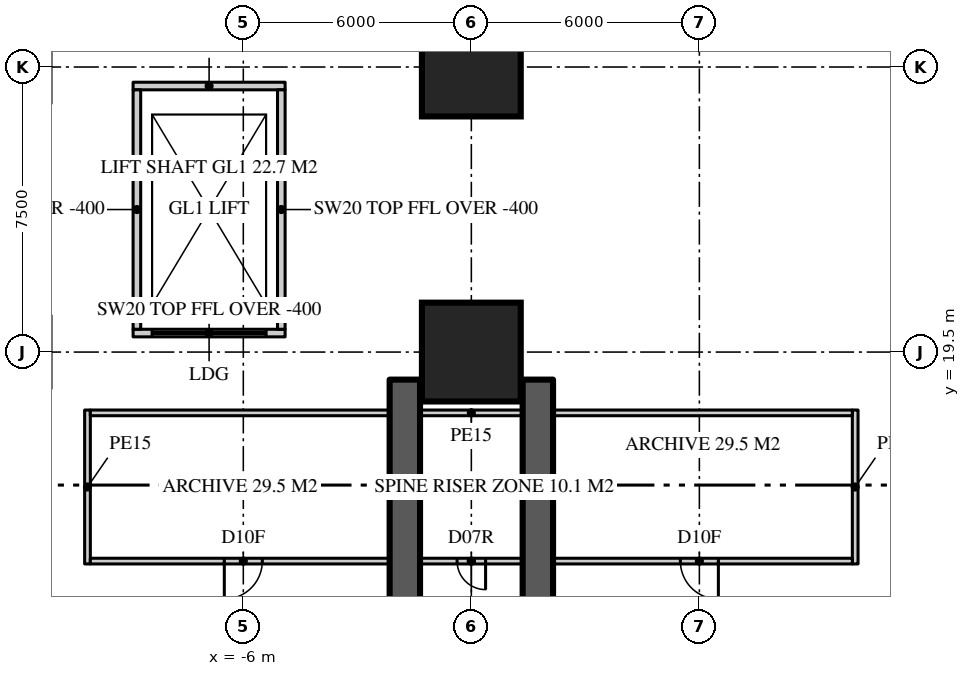
"""IFC4 building model, lengths in metres.
Left out: names, types, materials, properties, quantities, classifications, styles, units other than length and angle.
Written with IfcOpenShell. Run it as: python <this file> out.ifc"""

import sys

from ifc_helpers import new_model, si_unit, direction, frame, frame_2d, origin, origin_2d, place, context, subcontext, project, spatial, rectangle, extrude, element, fill, save


model = new_model("IFC4")
c1 = context("Model", 3, precision=1e-05, world=origin(), true_north=direction((0.0, 1.0)))
c2 = subcontext(c1, "Body", "Model", "MODEL_VIEW")
j1 = project(units=[si_unit("LENGTHUNIT", "METRE"), si_unit("PLANEANGLEUNIT", "RADIAN")], contexts=[c1])
p1 = place(None, origin())
s1 = spatial("IfcSite", under=j1, at=p1, CompositionType="ELEMENT")
p2 = place(p1, origin())
s2 = spatial("IfcBuilding", under=s1, at=p2, CompositionType="ELEMENT")
p3 = place(p2, frame((0.0, 0.0, -5.0)))
s3 = spatial("IfcBuildingStorey", under=s2, at=p3, CompositionType="ELEMENT", Elevation=-5.0)
for number, where, z_axis, x_axis in (
    (1, (1.75, 11.15, 0.0), (0.0, 0.0, 1.0), (0.0, 1.0, 0.0)),
    (2, (-1.75, 11.15, 0.0), (0.0, 0.0, 1.0), (0.0, 1.0, 0.0)),
):
    element("IfcWall", number, at=place(p3, frame(where, z_axis=z_axis, x_axis=x_axis)), inside=s3, PredefinedType="SHEAR", context=c2, shape_type="SweptSolid", body=[
        extrude(rectangle(XDim=7.625, YDim=0.8, at=frame_2d((3.812, 0.0))), origin(), (0.0, 0.0, 1.0), 5.0),
    ])
for number, where, z_axis, x_axis in (
    (3, (0.0, 19.5, 0.0), (0.0, 0.0, 1.0), (1.0, 0.0, 0.0)),
    (4, (0.0, 27.0, 0.0), (0.0, 0.0, 1.0), (1.0, 0.0, 0.0)),
):
    element("IfcColumn", number, at=place(p3, frame(where, z_axis=z_axis, x_axis=x_axis)), inside=s3, PredefinedType="COLUMN", context=c2, shape_type="SweptSolid", body=[
        extrude(rectangle(XDim=2.6, YDim=2.6, at=origin_2d()), origin(), (0.0, 0.0, 1.0), 5.0),
    ])
for number, where, z_axis, x_axis in (
    (5, (10.1, 13.925, 0.0), (0.0, 0.0, 1.0), (0.0, 1.0, 0.0)),
    (6, (-10.1, 13.925, 0.0), (0.0, 0.0, 1.0), (0.0, 1.0, 0.0)),
):
    element("IfcWall", number, at=place(p3, frame(where, z_axis=z_axis, x_axis=x_axis)), inside=s3, PredefinedType="SOLIDWALL", context=c2, shape_type="SweptSolid", body=[
        extrude(rectangle(XDim=4.05, YDim=0.15, at=frame_2d((2.025, 0.0))), origin(), (0.0, 0.0, 1.0), 4.6),
    ])
p4 = place(p3, frame((10.025, 17.9, 0.0), z_axis=(0.0, 0.0, 1.0), x_axis=(-1.0, 0.0, 0.0)))
e7 = element("IfcWall", 7, at=p4, inside=s3, PredefinedType="SOLIDWALL", context=c2, shape_type="SweptSolid", body=[
    extrude(rectangle(XDim=20.05, YDim=0.15, at=frame_2d((10.025, 0.0))), origin(), (0.0, 0.0, 1.0), 4.6),
])
p5 = place(p3, frame((10.025, 14.0, 0.0), z_axis=(0.0, 0.0, 1.0), x_axis=(-1.0, 0.0, 0.0)))
e8 = element("IfcWall", 8, at=p5, inside=s3, PredefinedType="SOLIDWALL", context=c2, shape_type="SweptSolid", body=[
    extrude(rectangle(XDim=20.05, YDim=0.15, at=frame_2d((10.025, 0.0))), origin(), (0.0, 0.0, 1.0), 4.6),
])
p6 = place(p5, frame((9.65, 0.0, 0.0)))
e9 = element("IfcOpeningElement", 9, at=p6, cuts=e8, PredefinedType="OPENING", context=c2, shape_type="SweptSolid", body=[
    extrude(rectangle(XDim=0.75, YDim=2.1, at=frame_2d((0.375, 1.05))), frame((0.0, 0.085, 0.0), z_axis=(0.0, -1.0, 0.0), x_axis=(1.0, 0.0, 0.0)), (0.0, 0.0, 1.0), 0.17),
])
p7 = place(p5, frame((3.525, 0.0, 0.0)))
e10 = element("IfcOpeningElement", 10, at=p7, cuts=e8, PredefinedType="OPENING", context=c2, shape_type="SweptSolid", body=[
    extrude(rectangle(XDim=1.0, YDim=2.2, at=frame_2d((0.5, 1.1))), frame((0.0, 0.085, 0.0), z_axis=(0.0, -1.0, 0.0), x_axis=(1.0, 0.0, 0.0)), (0.0, 0.0, 1.0), 0.17),
])
p8 = place(p5, frame((15.525, 0.0, 0.0)))
e11 = element("IfcOpeningElement", 11, at=p8, cuts=e8, PredefinedType="OPENING", context=c2, shape_type="SweptSolid", body=[
    extrude(rectangle(XDim=1.0, YDim=2.2, at=frame_2d((0.5, 1.1))), frame((0.0, 0.085, 0.0), z_axis=(0.0, -1.0, 0.0), x_axis=(1.0, 0.0, 0.0)), (0.0, 0.0, 1.0), 0.17),
])
p9 = place(p3, frame((-4.9, 20.0, 0.0), z_axis=(0.0, 0.0, 1.0), x_axis=(-1.0, 0.0, 0.0)))
e12 = element("IfcWall", 12, at=p9, inside=s3, PredefinedType="SOLIDWALL", context=c2, shape_type="SweptSolid", body=[
    extrude(rectangle(XDim=4.0, YDim=0.2, at=frame_2d((2.0, 0.0))), origin(), (0.0, 0.0, 1.0), 4.6),
])
p10 = place(p9, frame((0.5, 0.0, 0.0)))
e13 = element("IfcOpeningElement", 13, at=p10, cuts=e12, PredefinedType="OPENING", context=c2, shape_type="SweptSolid", body=[
    extrude(rectangle(XDim=3.0, YDim=3.0, at=frame_2d((1.5, 1.5))), frame((0.0, 0.11, 0.0), z_axis=(0.0, -1.0, 0.0), x_axis=(1.0, 0.0, 0.0)), (0.0, 0.0, 1.0), 0.22),
])
p11 = place(p3, frame((-8.9, 26.5, 0.0), z_axis=(0.0, 0.0, 1.0), x_axis=(1.0, 0.0, 0.0)))
e14 = element("IfcWall", 14, at=p11, inside=s3, PredefinedType="SOLIDWALL", context=c2, shape_type="SweptSolid", body=[
    extrude(rectangle(XDim=4.0, YDim=0.2, at=frame_2d((2.0, 0.0))), origin(), (0.0, 0.0, 1.0), 4.6),
])
for number, where, z_axis, x_axis in (
    (15, (-5.0, 20.1, 0.0), (0.0, 0.0, 1.0), (0.0, 1.0, 0.0)),
    (16, (-8.8, 26.4, 0.0), (0.0, 0.0, 1.0), (0.0, -1.0, 0.0)),
):
    element("IfcWall", number, at=place(p3, frame(where, z_axis=z_axis, x_axis=x_axis)), inside=s3, PredefinedType="SOLIDWALL", context=c2, shape_type="SweptSolid", body=[
        extrude(rectangle(XDim=6.3, YDim=0.2, at=frame_2d((3.15, 0.0))), origin(), (0.0, 0.0, 1.0), 4.6),
    ])
p12 = place(p10, origin())
e17 = element("IfcDoor", 17, at=p12, inside=s3, OperationType="SLIDING_TO_LEFT", PredefinedType="DOOR", context=c2, shape_type="SweptSolid", body=[
    extrude(rectangle(XDim=3.0, YDim=3.0, at=frame_2d((1.5, 1.5))), frame((0.0, 0.025, 0.0), z_axis=(0.0, -1.0, 0.0), x_axis=(1.0, 0.0, 0.0)), (0.0, 0.0, 1.0), 0.05),
])
fill(e13, e17)
p13 = place(p6, origin())
e18 = element("IfcDoor", 18, at=p13, inside=s3, OperationType="SINGLE_SWING_LEFT", PredefinedType="DOOR", context=c2, shape_type="SweptSolid", body=[
    extrude(rectangle(XDim=0.75, YDim=2.1, at=frame_2d((0.375, 1.05))), frame((0.0, 0.025, 0.0), z_axis=(0.0, -1.0, 0.0), x_axis=(1.0, 0.0, 0.0)), (0.0, 0.0, 1.0), 0.05),
])
fill(e9, e18)
p14 = place(p7, origin())
e19 = element("IfcDoor", 19, at=p14, inside=s3, OperationType="SINGLE_SWING_LEFT", PredefinedType="DOOR", context=c2, shape_type="SweptSolid", body=[
    extrude(rectangle(XDim=1.0, YDim=2.2, at=frame_2d((0.5, 1.1))), frame((0.0, 0.025, 0.0), z_axis=(0.0, -1.0, 0.0), x_axis=(1.0, 0.0, 0.0)), (0.0, 0.0, 1.0), 0.05),
])
fill(e10, e19)
p15 = place(p8, origin())
e20 = element("IfcDoor", 20, at=p15, inside=s3, OperationType="SINGLE_SWING_RIGHT", PredefinedType="DOOR", context=c2, shape_type="SweptSolid", body=[
    extrude(rectangle(XDim=1.0, YDim=2.2, at=frame_2d((0.5, 1.1))), frame((0.0, 0.025, 0.0), z_axis=(0.0, -1.0, 0.0), x_axis=(1.0, 0.0, 0.0)), (0.0, 0.0, 1.0), 0.05),
])
fill(e11, e20)
save(model, sys.argv[1])
